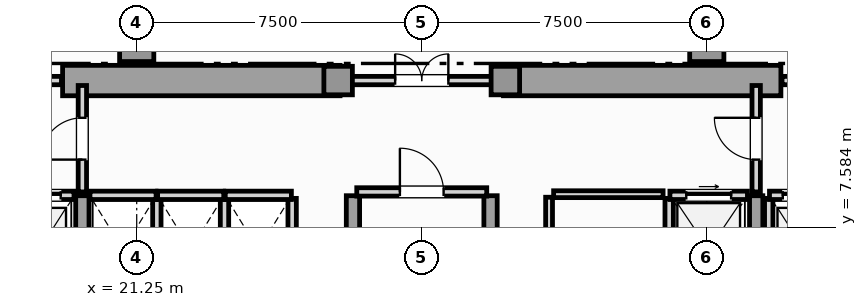
"""IFC4 building model, lengths in metres.
Left out: names, types, materials, properties, quantities, classifications, styles, units other than length and angle.
Written with IfcOpenShell. Run it as: python <this file> out.ifc"""

import sys

from ifc_helpers import new_model, si_unit, direction, frame, frame_2d, origin, origin_2d, place, context, subcontext, project, spatial, rectangle, extrude, element, fill, save


model = new_model("IFC4")
c1 = context("Model", 3, precision=1e-05, world=origin(), true_north=direction((0.0, 1.0)))
c2 = subcontext(c1, "Body", "Model", "MODEL_VIEW")
j1 = project(units=[si_unit("LENGTHUNIT", "METRE"), si_unit("PLANEANGLEUNIT", "RADIAN")], contexts=[c1])
p1 = place(None, origin())
s1 = spatial("IfcSite", under=j1, at=p1, CompositionType="ELEMENT")
p2 = place(p1, origin())
s2 = spatial("IfcBuilding", under=s1, at=p2, CompositionType="ELEMENT")
p3 = place(p2, frame((0.0, 0.0, 10.2)))
s3 = spatial("IfcBuildingStorey", under=s2, at=p3, CompositionType="ELEMENT", Elevation=10.2)
for number, where, z_axis, x_axis in (
    (1, (19.3, 11.45, 0.0), (0.0, 0.0, 1.0), (1.0, 0.0, 0.0)),
    (2, (30.9, 11.45, 0.0), (0.0, 0.0, 1.0), (1.0, 0.0, 0.0)),
):
    element("IfcWall", number, at=place(p3, frame(where, z_axis=z_axis, x_axis=x_axis)), inside=s3, PredefinedType="SHEAR", context=c2, shape_type="SweptSolid", body=[
        extrude(rectangle(XDim=7.3, YDim=0.8, at=frame_2d((3.65, 0.0))), origin(), (0.0, 0.0, 1.0), 4.52),
    ])
for number, where, z_axis, x_axis in (
    (3, (19.82, 0.92, 0.0), (0.0, 0.0, 1.0), (0.0, 1.0, 0.0)),
    (4, (26.94, 0.92, 0.0), (0.0, 0.0, 1.0), (0.0, 1.0, 0.0)),
    (5, (30.56, 0.92, 0.0), (0.0, 0.0, 1.0), (0.0, 1.0, 0.0)),
    (6, (37.55, 0.92, 0.0), (0.0, 0.0, 1.0), (0.0, 1.0, 0.0)),
):
    element("IfcWall", number, at=place(p3, frame(where, z_axis=z_axis, x_axis=x_axis)), inside=s3, PredefinedType="SHEAR", context=c2, shape_type="SweptSolid", body=[
        extrude(rectangle(XDim=7.5, YDim=0.35, at=frame_2d((3.75, 0.0))), origin(), (0.0, 0.0, 1.0), 4.52),
    ])
for number, where, z_axis, x_axis in (
    (7, (26.55, 11.45, 0.0), (0.0, 0.0, 1.0), (1.0, 0.0, 0.0)),
    (8, (30.95, 11.45, 0.0), (0.0, 0.0, 1.0), (1.0, 0.0, 0.0)),
):
    element("IfcColumn", number, at=place(p3, frame(where, z_axis=z_axis, x_axis=x_axis)), inside=s3, PredefinedType="COLUMN", context=c2, shape_type="SweptSolid", body=[
        extrude(rectangle(XDim=0.75, YDim=0.75, at=origin_2d()), origin(), (0.0, 0.0, 1.0), 4.8),
    ])
for number, where, z_axis, x_axis in (
    (9, (21.25, 12.4, 0.0), (0.0, 0.0, 1.0), (1.0, 0.0, 0.0)),
    (10, (36.25, 12.4, 0.0), (0.0, 0.0, 1.0), (1.0, 0.0, 0.0)),
):
    element("IfcColumn", number, at=place(p3, frame(where, z_axis=z_axis, x_axis=x_axis)), inside=s3, PredefinedType="COLUMN", context=c2, shape_type="SweptSolid", body=[
        extrude(rectangle(XDim=0.9, YDim=0.9, at=origin_2d()), origin(), (0.0, 0.0, 1.0), 4.8),
    ])
p4 = place(p3, frame((17.78, 8.43, 0.0), z_axis=(0.0, 0.0, 1.0), x_axis=(1.0, 0.0, 0.0)))
e11 = element("IfcWall", 11, at=p4, inside=s3, PredefinedType="SOLIDWALL", context=c2, shape_type="SweptSolid", body=[
    extrude(rectangle(XDim=1.82, YDim=0.22, at=frame_2d((0.91, 0.0))), origin(), (0.0, 0.0, 1.0), 4.52),
])
p5 = place(p4, frame((0.35, 0.0, 0.0)))
e12 = element("IfcOpeningElement", 12, at=p5, cuts=e11, PredefinedType="OPENING", context=c2, shape_type="SweptSolid", body=[
    extrude(rectangle(XDim=1.12, YDim=2.25, at=frame_2d((0.56, 1.125))), frame((0.0, 0.12, 0.0), z_axis=(0.0, -1.0, 0.0), x_axis=(1.0, 0.0, 0.0)), (0.0, 0.0, 1.0), 0.24),
])
p6 = place(p3, frame((37.88, 5.65, 0.0), z_axis=(0.0, 0.0, 1.0), x_axis=(0.0, 1.0, 0.0)))
e13 = element("IfcWall", 13, at=p6, inside=s3, PredefinedType="SOLIDWALL", context=c2, shape_type="SweptSolid", body=[
    extrude(rectangle(XDim=2.7, YDim=0.22, at=frame_2d((1.35, 0.0))), origin(), (0.0, 0.0, 1.0), 4.52),
])
p7 = place(p3, frame((37.9, 8.43, 0.0), z_axis=(0.0, 0.0, 1.0), x_axis=(1.0, 0.0, 0.0)))
e14 = element("IfcWall", 14, at=p7, inside=s3, PredefinedType="SOLIDWALL", context=c2, shape_type="SweptSolid", body=[
    extrude(rectangle(XDim=1.82, YDim=0.22, at=frame_2d((0.91, 0.0))), origin(), (0.0, 0.0, 1.0), 4.52),
])
p8 = place(p7, frame((0.35, 0.0, 0.0)))
e15 = element("IfcOpeningElement", 15, at=p8, cuts=e14, PredefinedType="OPENING", context=c2, shape_type="SweptSolid", body=[
    extrude(rectangle(XDim=1.12, YDim=2.25, at=frame_2d((0.56, 1.125))), frame((0.0, 0.12, 0.0), z_axis=(0.0, -1.0, 0.0), x_axis=(1.0, 0.0, 0.0)), (0.0, 0.0, 1.0), 0.24),
])
p9 = place(p3, frame((35.26, 5.65, 0.0), z_axis=(0.0, 0.0, 1.0), x_axis=(0.0, 1.0, 0.0)))
e16 = element("IfcWall", 16, at=p9, inside=s3, PredefinedType="SOLIDWALL", context=c2, shape_type="SweptSolid", body=[
    extrude(rectangle(XDim=2.7, YDim=0.22, at=frame_2d((1.35, 0.0))), origin(), (0.0, 0.0, 1.0), 4.52),
])
p10 = place(p3, frame((35.28, 8.43, 0.0), z_axis=(0.0, 0.0, 1.0), x_axis=(1.0, 0.0, 0.0)))
e17 = element("IfcWall", 17, at=p10, inside=s3, PredefinedType="SOLIDWALL", context=c2, shape_type="SweptSolid", body=[
    extrude(rectangle(XDim=2.04, YDim=0.22, at=frame_2d((1.02, 0.0))), origin(), (0.0, 0.0, 1.0), 4.52),
])
p11 = place(p10, frame((0.43, 0.0, 0.0)))
e18 = element("IfcOpeningElement", 18, at=p11, cuts=e17, PredefinedType="OPENING", context=c2, shape_type="SweptSolid", body=[
    extrude(rectangle(XDim=1.18, YDim=2.2, at=frame_2d((0.59, 1.1))), frame((0.0, 0.12, 0.0), z_axis=(0.0, -1.0, 0.0), x_axis=(1.0, 0.0, 0.0)), (0.0, 0.0, 1.0), 0.24),
])
p12 = place(p3, frame((21.78, 5.65, 0.0), z_axis=(0.0, 0.0, 1.0), x_axis=(0.0, 1.0, 0.0)))
e19 = element("IfcWall", 19, at=p12, inside=s3, PredefinedType="SOLIDWALL", context=c2, shape_type="SweptSolid", body=[
    extrude(rectangle(XDim=2.7, YDim=0.22, at=frame_2d((1.35, 0.0))), origin(), (0.0, 0.0, 1.0), 4.52),
])
p13 = place(p3, frame((20.02, 8.43, 0.0), z_axis=(0.0, 0.0, 1.0), x_axis=(1.0, 0.0, 0.0)))
e20 = element("IfcWall", 20, at=p13, inside=s3, PredefinedType="SOLIDWALL", context=c2, shape_type="SweptSolid", body=[
    extrude(rectangle(XDim=1.74, YDim=0.22, at=frame_2d((0.87, 0.0))), origin(), (0.0, 0.0, 1.0), 4.52),
])
p14 = place(p3, frame((23.56, 5.65, 0.0), z_axis=(0.0, 0.0, 1.0), x_axis=(0.0, 1.0, 0.0)))
e21 = element("IfcWall", 21, at=p14, inside=s3, PredefinedType="SOLIDWALL", context=c2, shape_type="SweptSolid", body=[
    extrude(rectangle(XDim=2.7, YDim=0.22, at=frame_2d((1.35, 0.0))), origin(), (0.0, 0.0, 1.0), 4.52),
])
p15 = place(p3, frame((21.8, 8.43, 0.0), z_axis=(0.0, 0.0, 1.0), x_axis=(1.0, 0.0, 0.0)))
e22 = element("IfcWall", 22, at=p15, inside=s3, PredefinedType="SOLIDWALL", context=c2, shape_type="SweptSolid", body=[
    extrude(rectangle(XDim=1.74, YDim=0.22, at=frame_2d((0.87, 0.0))), origin(), (0.0, 0.0, 1.0), 4.52),
])
p16 = place(p3, frame((25.34, 5.65, 0.0), z_axis=(0.0, 0.0, 1.0), x_axis=(0.0, 1.0, 0.0)))
e23 = element("IfcWall", 23, at=p16, inside=s3, PredefinedType="SOLIDWALL", context=c2, shape_type="SweptSolid", body=[
    extrude(rectangle(XDim=2.7, YDim=0.22, at=frame_2d((1.35, 0.0))), origin(), (0.0, 0.0, 1.0), 4.52),
])
p17 = place(p3, frame((23.58, 8.43, 0.0), z_axis=(0.0, 0.0, 1.0), x_axis=(1.0, 0.0, 0.0)))
e24 = element("IfcWall", 24, at=p17, inside=s3, PredefinedType="SOLIDWALL", context=c2, shape_type="SweptSolid", body=[
    extrude(rectangle(XDim=1.74, YDim=0.22, at=frame_2d((0.87, 0.0))), origin(), (0.0, 0.0, 1.0), 4.52),
])
p18 = place(p3, frame((27.04, 8.52, 0.0), z_axis=(0.0, 0.0, 1.0), x_axis=(1.0, 0.0, 0.0)))
e25 = element("IfcWall", 25, at=p18, inside=s3, PredefinedType="SOLIDWALL", context=c2, shape_type="SweptSolid", body=[
    extrude(rectangle(XDim=3.42, YDim=0.22, at=frame_2d((1.71, 0.0))), origin(), (0.0, 0.0, 1.0), 4.52),
])
p19 = place(p18, frame((1.135, 0.0, 0.0)))
e26 = element("IfcOpeningElement", 26, at=p19, cuts=e25, PredefinedType="OPENING", context=c2, shape_type="SweptSolid", body=[
    extrude(rectangle(XDim=1.15, YDim=2.2, at=frame_2d((0.575, 1.1))), frame((0.0, 0.12, 0.0), z_axis=(0.0, -1.0, 0.0), x_axis=(1.0, 0.0, 0.0)), (0.0, 0.0, 1.0), 0.24),
])
p20 = place(p3, frame((19.82, 8.52, 0.0), z_axis=(0.0, 0.0, 1.0), x_axis=(0.0, 1.0, 0.0)))
e27 = element("IfcWall", 27, at=p20, inside=s3, PredefinedType="SOLIDWALL", context=c2, shape_type="SweptSolid", body=[
    extrude(rectangle(XDim=2.8, YDim=0.22, at=frame_2d((1.4, 0.0))), origin(), (0.0, 0.0, 1.0), 3.976),
])
p21 = place(p20, frame((0.85, 0.0, 0.0)))
e28 = element("IfcOpeningElement", 28, at=p21, cuts=e27, PredefinedType="OPENING", context=c2, shape_type="SweptSolid", body=[
    extrude(rectangle(XDim=1.1, YDim=2.2, at=frame_2d((0.55, 1.1))), frame((0.0, 0.12, 0.0), z_axis=(0.0, -1.0, 0.0), x_axis=(1.0, 0.0, 0.0)), (0.0, 0.0, 1.0), 0.24),
])
p22 = place(p3, frame((37.55, 8.52, 0.0), z_axis=(0.0, 0.0, 1.0), x_axis=(0.0, 1.0, 0.0)))
e29 = element("IfcWall", 29, at=p22, inside=s3, PredefinedType="SOLIDWALL", context=c2, shape_type="SweptSolid", body=[
    extrude(rectangle(XDim=2.8, YDim=0.22, at=frame_2d((1.4, 0.0))), origin(), (0.0, 0.0, 1.0), 3.976),
])
p23 = place(p22, frame((0.85, 0.0, 0.0)))
e30 = element("IfcOpeningElement", 30, at=p23, cuts=e29, PredefinedType="OPENING", context=c2, shape_type="SweptSolid", body=[
    extrude(rectangle(XDim=1.1, YDim=2.2, at=frame_2d((0.55, 1.1))), frame((0.0, 0.12, 0.0), z_axis=(0.0, -1.0, 0.0), x_axis=(1.0, 0.0, 0.0)), (0.0, 0.0, 1.0), 0.24),
])
p24 = place(p3, frame((16.23, 11.45, 0.0), z_axis=(0.0, 0.0, 1.0), x_axis=(1.0, 0.0, 0.0)))
e31 = element("IfcWall", 31, at=p24, inside=s3, PredefinedType="SOLIDWALL", context=c2, shape_type="SweptSolid", body=[
    extrude(rectangle(XDim=3.04, YDim=0.22, at=frame_2d((1.52, 0.0))), origin(), (0.0, 0.0, 1.0), 4.52),
])
p25 = place(p24, frame((0.97, 0.0, 0.0)))
e32 = element("IfcOpeningElement", 32, at=p25, cuts=e31, PredefinedType="OPENING", context=c2, shape_type="SweptSolid", body=[
    extrude(rectangle(XDim=1.1, YDim=2.2, at=frame_2d((0.55, 1.1))), frame((0.0, 0.12, 0.0), z_axis=(0.0, -1.0, 0.0), x_axis=(1.0, 0.0, 0.0)), (0.0, 0.0, 1.0), 0.24),
])
p26 = place(p3, frame((26.63, 11.45, 0.0), z_axis=(0.0, 0.0, 1.0), x_axis=(1.0, 0.0, 0.0)))
e33 = element("IfcWall", 33, at=p26, inside=s3, PredefinedType="SOLIDWALL", context=c2, shape_type="SweptSolid", body=[
    extrude(rectangle(XDim=4.24, YDim=0.22, at=frame_2d((2.12, 0.0))), origin(), (0.0, 0.0, 1.0), 4.52),
])
p27 = place(p26, frame((1.42, 0.0, 0.0)))
e34 = element("IfcOpeningElement", 34, at=p27, cuts=e33, PredefinedType="OPENING", context=c2, shape_type="SweptSolid", body=[
    extrude(rectangle(XDim=1.4, YDim=2.2, at=frame_2d((0.7, 1.1))), frame((0.0, 0.12, 0.0), z_axis=(0.0, -1.0, 0.0), x_axis=(1.0, 0.0, 0.0)), (0.0, 0.0, 1.0), 0.24),
])
p28 = place(p3, frame((38.23, 11.45, 0.0), z_axis=(0.0, 0.0, 1.0), x_axis=(1.0, 0.0, 0.0)))
e35 = element("IfcWall", 35, at=p28, inside=s3, PredefinedType="SOLIDWALL", context=c2, shape_type="SweptSolid", body=[
    extrude(rectangle(XDim=3.04, YDim=0.22, at=frame_2d((1.52, 0.0))), origin(), (0.0, 0.0, 1.0), 4.52),
])
p29 = place(p28, frame((0.97, 0.0, 0.0)))
e36 = element("IfcOpeningElement", 36, at=p29, cuts=e35, PredefinedType="OPENING", context=c2, shape_type="SweptSolid", body=[
    extrude(rectangle(XDim=1.1, YDim=2.2, at=frame_2d((0.55, 1.1))), frame((0.0, 0.12, 0.0), z_axis=(0.0, -1.0, 0.0), x_axis=(1.0, 0.0, 0.0)), (0.0, 0.0, 1.0), 0.24),
])
p30 = place(p3, frame((32.1, 5.65, 0.0), z_axis=(0.0, 0.0, 1.0), x_axis=(0.0, 1.0, 0.0)))
e37 = element("IfcWall", 37, at=p30, inside=s3, PredefinedType="PARTITIONING", context=c2, shape_type="SweptSolid", body=[
    extrude(rectangle(XDim=2.73, YDim=0.18, at=frame_2d((1.365, 0.0))), origin(), (0.0, 0.0, 1.0), 4.52),
])
p31 = place(p30, frame((0.84, 0.0, 0.0)))
e38 = element("IfcOpeningElement", 38, at=p31, cuts=e37, PredefinedType="OPENING", context=c2, shape_type="SweptSolid", body=[
    extrude(rectangle(XDim=1.05, YDim=2.15, at=frame_2d((0.525, 1.075))), frame((0.0, 0.1, 0.0), z_axis=(0.0, -1.0, 0.0), x_axis=(1.0, 0.0, 0.0)), (0.0, 0.0, 1.0), 0.2),
])
p32 = place(p3, frame((32.22, 8.46, 0.0), z_axis=(0.0, 0.0, 1.0), x_axis=(1.0, 0.0, 0.0)))
e39 = element("IfcWall", 39, at=p32, inside=s3, PredefinedType="PARTITIONING", context=c2, shape_type="SweptSolid", body=[
    extrude(rectangle(XDim=2.88, YDim=0.18, at=frame_2d((1.44, 0.0))), origin(), (0.0, 0.0, 1.0), 4.52),
])
p33 = place(p5, origin())
e40 = element("IfcDoor", 40, at=p33, inside=s3, OperationType="SLIDING_TO_RIGHT", PredefinedType="DOOR", context=c2, shape_type="SweptSolid", body=[
    extrude(rectangle(XDim=1.12, YDim=2.25, at=frame_2d((0.56, 1.125))), frame((0.0, 0.025, 0.0), z_axis=(0.0, -1.0, 0.0), x_axis=(1.0, 0.0, 0.0)), (0.0, 0.0, 1.0), 0.05),
])
fill(e12, e40)
p34 = place(p8, origin())
e41 = element("IfcDoor", 41, at=p34, inside=s3, OperationType="SLIDING_TO_LEFT", PredefinedType="DOOR", context=c2, shape_type="SweptSolid", body=[
    extrude(rectangle(XDim=1.12, YDim=2.25, at=frame_2d((0.56, 1.125))), frame((0.0, 0.025, 0.0), z_axis=(0.0, -1.0, 0.0), x_axis=(1.0, 0.0, 0.0)), (0.0, 0.0, 1.0), 0.05),
])
fill(e15, e41)
p35 = place(p11, origin())
e42 = element("IfcDoor", 42, at=p35, inside=s3, OperationType="SLIDING_TO_RIGHT", PredefinedType="DOOR", context=c2, shape_type="SweptSolid", body=[
    extrude(rectangle(XDim=1.18, YDim=2.2, at=frame_2d((0.59, 1.1))), frame((0.0, 0.025, 0.0), z_axis=(0.0, -1.0, 0.0), x_axis=(1.0, 0.0, 0.0)), (0.0, 0.0, 1.0), 0.05),
])
fill(e18, e42)
p36 = place(p19, origin())
e43 = element("IfcDoor", 43, at=p36, inside=s3, OperationType="SINGLE_SWING_LEFT", PredefinedType="DOOR", context=c2, shape_type="SweptSolid", body=[
    extrude(rectangle(XDim=1.15, YDim=2.2, at=frame_2d((0.575, 1.1))), frame((0.0, 0.025, 0.0), z_axis=(0.0, -1.0, 0.0), x_axis=(1.0, 0.0, 0.0)), (0.0, 0.0, 1.0), 0.05),
])
fill(e26, e43)
p37 = place(p21, origin())
e44 = element("IfcDoor", 44, at=p37, inside=s3, OperationType="SINGLE_SWING_LEFT", PredefinedType="DOOR", context=c2, shape_type="SweptSolid", body=[
    extrude(rectangle(XDim=1.1, YDim=2.2, at=frame_2d((0.55, 1.1))), frame((0.0, 0.025, 0.0), z_axis=(0.0, -1.0, 0.0), x_axis=(1.0, 0.0, 0.0)), (0.0, 0.0, 1.0), 0.05),
])
fill(e28, e44)
p38 = place(p23, origin())
e45 = element("IfcDoor", 45, at=p38, inside=s3, OperationType="SINGLE_SWING_RIGHT", PredefinedType="DOOR", context=c2, shape_type="SweptSolid", body=[
    extrude(rectangle(XDim=1.1, YDim=2.2, at=frame_2d((0.55, 1.1))), frame((0.0, 0.025, 0.0), z_axis=(0.0, -1.0, 0.0), x_axis=(1.0, 0.0, 0.0)), (0.0, 0.0, 1.0), 0.05),
])
fill(e30, e45)
p39 = place(p27, origin())
e46 = element("IfcDoor", 46, at=p39, inside=s3, OperationType="DOUBLE_DOOR_SINGLE_SWING", PredefinedType="DOOR", context=c2, shape_type="SweptSolid", body=[
    extrude(rectangle(XDim=1.4, YDim=2.2, at=frame_2d((0.7, 1.1))), frame((0.0, 0.025, 0.0), z_axis=(0.0, -1.0, 0.0), x_axis=(1.0, 0.0, 0.0)), (0.0, 0.0, 1.0), 0.05),
])
fill(e34, e46)
save(model, sys.argv[1])
